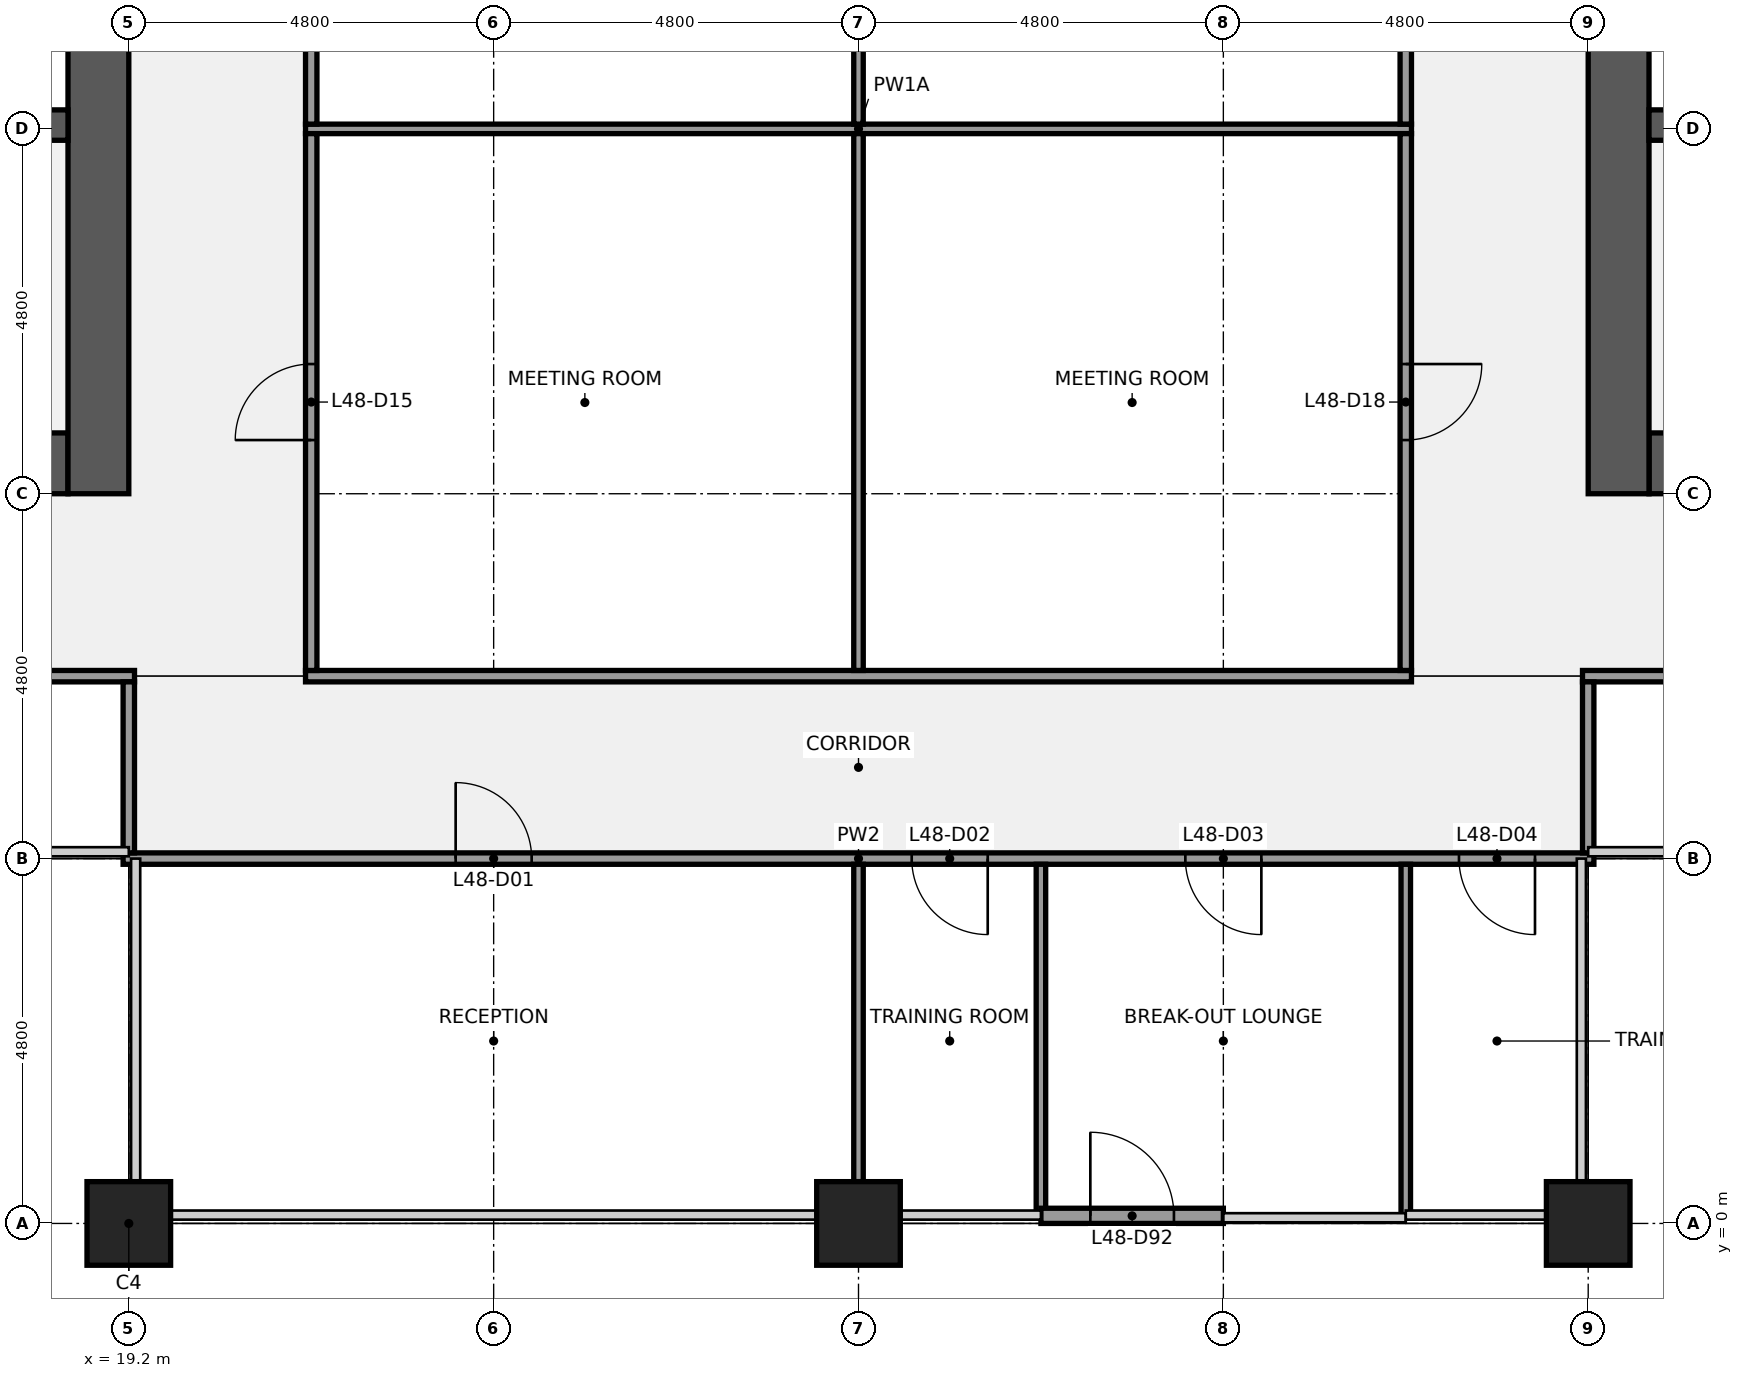
"""IFC4 building model, lengths in metres.
Left out: names, types, materials, properties, quantities, classifications, styles, units other than length and angle.
Written with IfcOpenShell. Run it as: python <this file> out.ifc"""

import sys

from ifc_helpers import new_model, si_unit, direction, frame, frame_2d, origin, origin_2d, place, context, subcontext, project, spatial, rectangle, extrude, element, fill, save


model = new_model("IFC4")
c1 = context("Model", 3, precision=1e-05, world=origin(), true_north=direction((0.0, 1.0)))
c2 = subcontext(c1, "Body", "Model", "MODEL_VIEW")
j1 = project(units=[si_unit("LENGTHUNIT", "METRE"), si_unit("PLANEANGLEUNIT", "RADIAN")], contexts=[c1])
p1 = place(None, origin())
s1 = spatial("IfcSite", under=j1, at=p1, CompositionType="ELEMENT")
p2 = place(p1, origin())
s2 = spatial("IfcBuilding", under=s1, at=p2, CompositionType="ELEMENT")
p3 = place(p2, frame((0.0, 0.0, 221.2)))
s3 = spatial("IfcBuildingStorey", under=s2, at=p3, CompositionType="ELEMENT", Elevation=221.2)
for number, where, z_axis, x_axis in (
    (1, (19.2, 0.0, 0.0), (0.0, 0.0, 1.0), (1.0, 0.0, 0.0)),
    (2, (28.8, 0.0, 0.0), (0.0, 0.0, 1.0), (1.0, 0.0, 0.0)),
    (3, (38.4, 0.0, 0.0), (0.0, 0.0, 1.0), (1.0, 0.0, 0.0)),
):
    element("IfcColumn", number, at=place(p3, frame(where, z_axis=z_axis, x_axis=x_axis)), inside=s3, PredefinedType="COLUMN", context=c2, shape_type="SweptSolid", body=[
        extrude(rectangle(XDim=1.1, YDim=1.1, at=origin_2d()), origin(), (0.0, 0.0, 1.0), 4.0),
    ])
p4 = place(p3, frame((18.4, 10.0, 0.0), z_axis=(0.0, 0.0, 1.0), x_axis=(-1.0, 0.0, 0.0)))
e4 = element("IfcWall", 4, at=p4, inside=s3, PredefinedType="SHEAR", context=c2, shape_type="SweptSolid", body=[
    extrude(rectangle(XDim=4.0, YDim=0.8, at=frame_2d((2.0, 0.0))), origin(), (0.0, 0.0, 1.0), 3.84),
])
p5 = place(p4, frame((1.05, 0.0, 0.0)))
e5 = element("IfcOpeningElement", 5, at=p5, cuts=e4, PredefinedType="OPENING", context=c2, shape_type="SweptSolid", body=[
    extrude(rectangle(XDim=1.1, YDim=2.1, at=frame_2d((0.55, 1.05))), frame((0.0, 0.41, 0.0), z_axis=(0.0, -1.0, 0.0), x_axis=(1.0, 0.0, 0.0)), (0.0, 0.0, 1.0), 0.82),
])
p6 = place(p3, frame((18.8, 38.4, 0.0), z_axis=(0.0, 0.0, 1.0), x_axis=(0.0, -1.0, 0.0)))
e6 = element("IfcWall", 6, at=p6, inside=s3, PredefinedType="SHEAR", context=c2, shape_type="SweptSolid", body=[
    extrude(rectangle(XDim=28.8, YDim=0.8, at=frame_2d((14.4, 0.0))), origin(), (0.0, 0.0, 1.0), 3.84),
])
p7 = place(p6, frame((18.3, 0.0, 0.0)))
e7 = element("IfcOpeningElement", 7, at=p7, cuts=e6, PredefinedType="OPENING", context=c2, shape_type="SweptSolid", body=[
    extrude(rectangle(XDim=1.8, YDim=2.1, at=frame_2d((0.9, 1.05))), frame((0.0, 0.41, 0.0), z_axis=(0.0, -1.0, 0.0), x_axis=(1.0, 0.0, 0.0)), (0.0, 0.0, 1.0), 0.82),
])
p8 = place(p6, frame((8.7, 0.0, 0.0)))
e8 = element("IfcOpeningElement", 8, at=p8, cuts=e6, PredefinedType="OPENING", context=c2, shape_type="SweptSolid", body=[
    extrude(rectangle(XDim=1.8, YDim=2.1, at=frame_2d((0.9, 1.05))), frame((0.0, 0.41, 0.0), z_axis=(0.0, -1.0, 0.0), x_axis=(1.0, 0.0, 0.0)), (0.0, 0.0, 1.0), 0.82),
])
p9 = place(p3, frame((0.8, 14.45, 0.0), z_axis=(0.0, 0.0, 1.0), x_axis=(1.0, 0.0, 0.0)))
e9 = element("IfcWall", 9, at=p9, inside=s3, PredefinedType="SHEAR", context=c2, shape_type="SweptSolid", body=[
    extrude(rectangle(XDim=17.6, YDim=0.4, at=frame_2d((8.8, 0.0))), origin(), (0.0, 0.0, 1.0), 3.84),
])
p10 = place(p3, frame((48.0, 10.0, 0.0), z_axis=(0.0, 0.0, 1.0), x_axis=(-1.0, 0.0, 0.0)))
e10 = element("IfcWall", 10, at=p10, inside=s3, PredefinedType="SHEAR", context=c2, shape_type="SweptSolid", body=[
    extrude(rectangle(XDim=8.8, YDim=0.8, at=frame_2d((4.4, 0.0))), origin(), (0.0, 0.0, 1.0), 3.84),
])
p11 = place(p10, frame((6.65, 0.0, 0.0)))
e11 = element("IfcOpeningElement", 11, at=p11, cuts=e10, PredefinedType="OPENING", context=c2, shape_type="SweptSolid", body=[
    extrude(rectangle(XDim=1.1, YDim=2.1, at=frame_2d((0.55, 1.05))), frame((0.0, 0.41, 0.0), z_axis=(0.0, -1.0, 0.0), x_axis=(1.0, 0.0, 0.0)), (0.0, 0.0, 1.0), 0.82),
])
p12 = place(p3, frame((38.8, 9.6, 0.0), z_axis=(0.0, 0.0, 1.0), x_axis=(0.0, 1.0, 0.0)))
e12 = element("IfcWall", 12, at=p12, inside=s3, PredefinedType="SHEAR", context=c2, shape_type="SweptSolid", body=[
    extrude(rectangle(XDim=28.8, YDim=0.8, at=frame_2d((14.4, 0.0))), origin(), (0.0, 0.0, 1.0), 3.84),
])
p13 = place(p12, frame((8.7, 0.0, 0.0)))
e13 = element("IfcOpeningElement", 13, at=p13, cuts=e12, PredefinedType="OPENING", context=c2, shape_type="SweptSolid", body=[
    extrude(rectangle(XDim=1.8, YDim=2.1, at=frame_2d((0.9, 1.05))), frame((0.0, 0.41, 0.0), z_axis=(0.0, -1.0, 0.0), x_axis=(1.0, 0.0, 0.0)), (0.0, 0.0, 1.0), 0.82),
])
p14 = place(p12, frame((18.3, 0.0, 0.0)))
e14 = element("IfcOpeningElement", 14, at=p14, cuts=e12, PredefinedType="OPENING", context=c2, shape_type="SweptSolid", body=[
    extrude(rectangle(XDim=1.8, YDim=2.1, at=frame_2d((0.9, 1.05))), frame((0.0, 0.41, 0.0), z_axis=(0.0, -1.0, 0.0), x_axis=(1.0, 0.0, 0.0)), (0.0, 0.0, 1.0), 0.82),
])
p15 = place(p3, frame((39.2, 14.45, 0.0), z_axis=(0.0, 0.0, 1.0), x_axis=(1.0, 0.0, 0.0)))
e15 = element("IfcWall", 15, at=p15, inside=s3, PredefinedType="SHEAR", context=c2, shape_type="SweptSolid", body=[
    extrude(rectangle(XDim=17.6, YDim=0.4, at=frame_2d((8.8, 0.0))), origin(), (0.0, 0.0, 1.0), 3.84),
])
p16 = place(p3, frame((19.125, 4.8, 0.0), z_axis=(0.0, 0.0, 1.0), x_axis=(1.0, 0.0, 0.0)))
e16 = element("IfcWall", 16, at=p16, inside=s3, PredefinedType="PARTITIONING", context=c2, shape_type="SweptSolid", body=[
    extrude(rectangle(XDim=19.35, YDim=0.15, at=frame_2d((9.675, 0.0))), origin(), (0.0, 0.0, 1.0), 2.87),
])
p17 = place(p16, frame((4.375, 0.0, 0.0)))
e17 = element("IfcOpeningElement", 17, at=p17, cuts=e16, PredefinedType="OPENING", context=c2, shape_type="SweptSolid", body=[
    extrude(rectangle(XDim=1.0, YDim=2.1, at=frame_2d((0.5, 1.05))), frame((0.0, 0.085, 0.0), z_axis=(0.0, -1.0, 0.0), x_axis=(1.0, 0.0, 0.0)), (0.0, 0.0, 1.0), 0.17),
])
p18 = place(p16, frame((10.375, 0.0, 0.0)))
e18 = element("IfcOpeningElement", 18, at=p18, cuts=e16, PredefinedType="OPENING", context=c2, shape_type="SweptSolid", body=[
    extrude(rectangle(XDim=1.0, YDim=2.1, at=frame_2d((0.5, 1.05))), frame((0.0, 0.085, 0.0), z_axis=(0.0, -1.0, 0.0), x_axis=(1.0, 0.0, 0.0)), (0.0, 0.0, 1.0), 0.17),
])
p19 = place(p16, frame((13.975, 0.0, 0.0)))
e19 = element("IfcOpeningElement", 19, at=p19, cuts=e16, PredefinedType="OPENING", context=c2, shape_type="SweptSolid", body=[
    extrude(rectangle(XDim=1.0, YDim=2.1, at=frame_2d((0.5, 1.05))), frame((0.0, 0.085, 0.0), z_axis=(0.0, -1.0, 0.0), x_axis=(1.0, 0.0, 0.0)), (0.0, 0.0, 1.0), 0.17),
])
p20 = place(p16, frame((17.575, 0.0, 0.0)))
e20 = element("IfcOpeningElement", 20, at=p20, cuts=e16, PredefinedType="OPENING", context=c2, shape_type="SweptSolid", body=[
    extrude(rectangle(XDim=1.0, YDim=2.1, at=frame_2d((0.5, 1.05))), frame((0.0, 0.085, 0.0), z_axis=(0.0, -1.0, 0.0), x_axis=(1.0, 0.0, 0.0)), (0.0, 0.0, 1.0), 0.17),
])
p21 = place(p3, frame((14.5, 7.2, 0.0), z_axis=(0.0, 0.0, 1.0), x_axis=(1.0, 0.0, 0.0)))
e21 = element("IfcWall", 21, at=p21, inside=s3, PredefinedType="PARTITIONING", context=c2, shape_type="SweptSolid", body=[
    extrude(rectangle(XDim=4.775, YDim=0.15, at=frame_2d((2.387, 0.0))), origin(), (0.0, 0.0, 1.0), 2.87),
])
p22 = place(p21, frame((1.85, 0.0, 0.0)))
e22 = element("IfcOpeningElement", 22, at=p22, cuts=e21, PredefinedType="OPENING", context=c2, shape_type="SweptSolid", body=[
    extrude(rectangle(XDim=1.0, YDim=2.1, at=frame_2d((0.5, 1.05))), frame((0.0, 0.085, 0.0), z_axis=(0.0, -1.0, 0.0), x_axis=(1.0, 0.0, 0.0)), (0.0, 0.0, 1.0), 0.17),
])
p23 = place(p3, frame((21.525, 7.2, 0.0), z_axis=(0.0, 0.0, 1.0), x_axis=(1.0, 0.0, 0.0)))
e23 = element("IfcWall", 23, at=p23, inside=s3, PredefinedType="PARTITIONING", context=c2, shape_type="SweptSolid", body=[
    extrude(rectangle(XDim=14.55, YDim=0.15, at=frame_2d((7.275, 0.0))), origin(), (0.0, 0.0, 1.0), 2.87),
])
p24 = place(p3, frame((38.325, 7.2, 0.0), z_axis=(0.0, 0.0, 1.0), x_axis=(1.0, 0.0, 0.0)))
e24 = element("IfcWall", 24, at=p24, inside=s3, PredefinedType="PARTITIONING", context=c2, shape_type="SweptSolid", body=[
    extrude(rectangle(XDim=9.575, YDim=0.15, at=frame_2d((4.788, 0.0))), origin(), (0.0, 0.0, 1.0), 2.87),
])
p25 = place(p24, frame((4.325, 0.0, 0.0)))
e25 = element("IfcOpeningElement", 25, at=p25, cuts=e24, PredefinedType="OPENING", context=c2, shape_type="SweptSolid", body=[
    extrude(rectangle(XDim=1.0, YDim=2.1, at=frame_2d((0.5, 1.05))), frame((0.0, 0.085, 0.0), z_axis=(0.0, -1.0, 0.0), x_axis=(1.0, 0.0, 0.0)), (0.0, 0.0, 1.0), 0.17),
])
p26 = place(p3, frame((21.525, 14.4, 0.0), z_axis=(0.0, 0.0, 1.0), x_axis=(1.0, 0.0, 0.0)))
e26 = element("IfcWall", 26, at=p26, inside=s3, PredefinedType="PARTITIONING", context=c2, shape_type="SweptSolid", body=[
    extrude(rectangle(XDim=14.55, YDim=0.125, at=frame_2d((7.275, 0.0))), origin(), (0.0, 0.0, 1.0), 2.87),
])
p27 = place(p3, frame((19.2, 4.875, 0.0), z_axis=(0.0, 0.0, 1.0), x_axis=(0.0, 1.0, 0.0)))
e27 = element("IfcWall", 27, at=p27, inside=s3, PredefinedType="PARTITIONING", context=c2, shape_type="SweptSolid", body=[
    extrude(rectangle(XDim=2.25, YDim=0.15, at=frame_2d((1.125, 0.0))), origin(), (0.0, 0.0, 1.0), 2.87),
])
p28 = place(p3, frame((21.6, 7.275, 0.0), z_axis=(0.0, 0.0, 1.0), x_axis=(0.0, 1.0, 0.0)))
e28 = element("IfcWall", 28, at=p28, inside=s3, PredefinedType="PARTITIONING", context=c2, shape_type="SweptSolid", body=[
    extrude(rectangle(XDim=7.062, YDim=0.15, at=frame_2d((3.531, 0.0))), origin(), (0.0, 0.0, 1.0), 2.87),
])
p29 = place(p28, frame((3.031, 0.0, 0.0)))
e29 = element("IfcOpeningElement", 29, at=p29, cuts=e28, PredefinedType="OPENING", context=c2, shape_type="SweptSolid", body=[
    extrude(rectangle(XDim=1.0, YDim=2.1, at=frame_2d((0.5, 1.05))), frame((0.0, 0.085, 0.0), z_axis=(0.0, -1.0, 0.0), x_axis=(1.0, 0.0, 0.0)), (0.0, 0.0, 1.0), 0.17),
])
p30 = place(p3, frame((21.6, 14.462, 0.0), z_axis=(0.0, 0.0, 1.0), x_axis=(0.0, 1.0, 0.0)))
e30 = element("IfcWall", 30, at=p30, inside=s3, PredefinedType="PARTITIONING", context=c2, shape_type="SweptSolid", body=[
    extrude(rectangle(XDim=9.475, YDim=0.15, at=frame_2d((4.738, 0.0))), origin(), (0.0, 0.0, 1.0), 2.87),
])
p31 = place(p30, frame((4.238, 0.0, 0.0)))
e31 = element("IfcOpeningElement", 31, at=p31, cuts=e30, PredefinedType="OPENING", context=c2, shape_type="SweptSolid", body=[
    extrude(rectangle(XDim=1.0, YDim=2.1, at=frame_2d((0.5, 1.05))), frame((0.0, 0.085, 0.0), z_axis=(0.0, -1.0, 0.0), x_axis=(1.0, 0.0, 0.0)), (0.0, 0.0, 1.0), 0.17),
])
p32 = place(p3, frame((28.8, 0.55, 0.0), z_axis=(0.0, 0.0, 1.0), x_axis=(0.0, 1.0, 0.0)))
e32 = element("IfcWall", 32, at=p32, inside=s3, PredefinedType="PARTITIONING", context=c2, shape_type="SweptSolid", body=[
    extrude(rectangle(XDim=4.175, YDim=0.125, at=frame_2d((2.087, 0.0))), origin(), (0.0, 0.0, 1.0), 2.87),
])
p33 = place(p3, frame((28.8, 7.275, 0.0), z_axis=(0.0, 0.0, 1.0), x_axis=(0.0, 1.0, 0.0)))
e33 = element("IfcWall", 33, at=p33, inside=s3, PredefinedType="PARTITIONING", context=c2, shape_type="SweptSolid", body=[
    extrude(rectangle(XDim=7.062, YDim=0.125, at=frame_2d((3.531, 0.0))), origin(), (0.0, 0.0, 1.0), 2.87),
])
p34 = place(p3, frame((28.8, 14.462, 0.0), z_axis=(0.0, 0.0, 1.0), x_axis=(0.0, 1.0, 0.0)))
e34 = element("IfcWall", 34, at=p34, inside=s3, PredefinedType="PARTITIONING", context=c2, shape_type="SweptSolid", body=[
    extrude(rectangle(XDim=9.475, YDim=0.125, at=frame_2d((4.738, 0.0))), origin(), (0.0, 0.0, 1.0), 2.87),
])
for number, where, z_axis, x_axis in (
    (35, (31.2, 0.1, 0.0), (0.0, 0.0, 1.0), (0.0, 1.0, 0.0)),
    (36, (36.0, 0.1, 0.0), (0.0, 0.0, 1.0), (0.0, 1.0, 0.0)),
):
    element("IfcWall", number, at=place(p3, frame(where, z_axis=z_axis, x_axis=x_axis)), inside=s3, PredefinedType="PARTITIONING", context=c2, shape_type="SweptSolid", body=[
        extrude(rectangle(XDim=4.625, YDim=0.125, at=frame_2d((2.312, 0.0))), origin(), (0.0, 0.0, 1.0), 2.87),
    ])
p35 = place(p3, frame((36.0, 7.275, 0.0), z_axis=(0.0, 0.0, 1.0), x_axis=(0.0, 1.0, 0.0)))
e37 = element("IfcWall", 37, at=p35, inside=s3, PredefinedType="PARTITIONING", context=c2, shape_type="SweptSolid", body=[
    extrude(rectangle(XDim=7.062, YDim=0.15, at=frame_2d((3.531, 0.0))), origin(), (0.0, 0.0, 1.0), 2.87),
])
p36 = place(p35, frame((3.031, 0.0, 0.0)))
e38 = element("IfcOpeningElement", 38, at=p36, cuts=e37, PredefinedType="OPENING", context=c2, shape_type="SweptSolid", body=[
    extrude(rectangle(XDim=1.0, YDim=2.1, at=frame_2d((0.5, 1.05))), frame((0.0, 0.085, 0.0), z_axis=(0.0, -1.0, 0.0), x_axis=(1.0, 0.0, 0.0)), (0.0, 0.0, 1.0), 0.17),
])
p37 = place(p3, frame((36.0, 14.462, 0.0), z_axis=(0.0, 0.0, 1.0), x_axis=(0.0, 1.0, 0.0)))
e39 = element("IfcWall", 39, at=p37, inside=s3, PredefinedType="PARTITIONING", context=c2, shape_type="SweptSolid", body=[
    extrude(rectangle(XDim=9.475, YDim=0.15, at=frame_2d((4.738, 0.0))), origin(), (0.0, 0.0, 1.0), 2.87),
])
p38 = place(p37, frame((4.238, 0.0, 0.0)))
e40 = element("IfcOpeningElement", 40, at=p38, cuts=e39, PredefinedType="OPENING", context=c2, shape_type="SweptSolid", body=[
    extrude(rectangle(XDim=1.0, YDim=2.1, at=frame_2d((0.5, 1.05))), frame((0.0, 0.085, 0.0), z_axis=(0.0, -1.0, 0.0), x_axis=(1.0, 0.0, 0.0)), (0.0, 0.0, 1.0), 0.17),
])
p39 = place(p3, frame((38.4, 4.875, 0.0), z_axis=(0.0, 0.0, 1.0), x_axis=(0.0, 1.0, 0.0)))
e41 = element("IfcWall", 41, at=p39, inside=s3, PredefinedType="PARTITIONING", context=c2, shape_type="SweptSolid", body=[
    extrude(rectangle(XDim=2.25, YDim=0.15, at=frame_2d((1.125, 0.0))), origin(), (0.0, 0.0, 1.0), 2.87),
])
p40 = place(p3, frame((31.2, 0.1, 0.0), z_axis=(0.0, 0.0, 1.0), x_axis=(1.0, 0.0, 0.0)))
e42 = element("IfcWall", 42, at=p40, inside=s3, PredefinedType="SOLIDWALL", context=c2, shape_type="SweptSolid", body=[
    extrude(rectangle(XDim=2.4, YDim=0.2, at=frame_2d((1.2, 0.0))), origin(), (0.0, 0.0, 1.0), 3.314),
])
p41 = place(p40, frame((0.65, 0.0, 0.0)))
e43 = element("IfcOpeningElement", 43, at=p41, cuts=e42, PredefinedType="OPENING", context=c2, shape_type="SweptSolid", body=[
    extrude(rectangle(XDim=1.1, YDim=2.1, at=frame_2d((0.55, 1.05))), frame((0.0, 0.11, 0.0), z_axis=(0.0, -1.0, 0.0), x_axis=(1.0, 0.0, 0.0)), (0.0, 0.0, 1.0), 0.22),
])
for number, where, z_axis, x_axis in (
    (44, (19.2, -1.025, 0.0), (0.0, 0.0, 1.0), (1.0, 0.0, 0.0)),
    (45, (38.4, -1.025, 0.0), (0.0, 0.0, 1.0), (1.0, 0.0, 0.0)),
):
    element("IfcColumn", number, at=place(p3, frame(where, z_axis=z_axis, x_axis=x_axis)), inside=s3, PredefinedType="PILASTER", context=c2, shape_type="SweptSolid", body=[
        extrude(rectangle(XDim=2.4, YDim=0.95, at=origin_2d()), origin(), (0.0, 0.0, 1.0), 4.0),
    ])
p42 = place(p17, origin())
e46 = element("IfcDoor", 46, at=p42, inside=s3, OperationType="SINGLE_SWING_LEFT", PredefinedType="DOOR", context=c2, shape_type="SweptSolid", body=[
    extrude(rectangle(XDim=1.0, YDim=2.1, at=frame_2d((0.5, 1.05))), frame((0.0, 0.025, 0.0), z_axis=(0.0, -1.0, 0.0), x_axis=(1.0, 0.0, 0.0)), (0.0, 0.0, 1.0), 0.05),
])
fill(e17, e46)
p43 = place(p18, origin())
e47 = element("IfcDoor", 47, at=p43, inside=s3, OperationType="SINGLE_SWING_RIGHT", PredefinedType="DOOR", context=c2, shape_type="SweptSolid", body=[
    extrude(rectangle(XDim=1.0, YDim=2.1, at=frame_2d((0.5, 1.05))), frame((0.0, 0.025, 0.0), z_axis=(0.0, -1.0, 0.0), x_axis=(1.0, 0.0, 0.0)), (0.0, 0.0, 1.0), 0.05),
])
fill(e18, e47)
p44 = place(p19, origin())
e48 = element("IfcDoor", 48, at=p44, inside=s3, OperationType="SINGLE_SWING_RIGHT", PredefinedType="DOOR", context=c2, shape_type="SweptSolid", body=[
    extrude(rectangle(XDim=1.0, YDim=2.1, at=frame_2d((0.5, 1.05))), frame((0.0, 0.025, 0.0), z_axis=(0.0, -1.0, 0.0), x_axis=(1.0, 0.0, 0.0)), (0.0, 0.0, 1.0), 0.05),
])
fill(e19, e48)
p45 = place(p20, origin())
e49 = element("IfcDoor", 49, at=p45, inside=s3, OperationType="SINGLE_SWING_RIGHT", PredefinedType="DOOR", context=c2, shape_type="SweptSolid", body=[
    extrude(rectangle(XDim=1.0, YDim=2.1, at=frame_2d((0.5, 1.05))), frame((0.0, 0.025, 0.0), z_axis=(0.0, -1.0, 0.0), x_axis=(1.0, 0.0, 0.0)), (0.0, 0.0, 1.0), 0.05),
])
fill(e20, e49)
p46 = place(p29, origin())
e50 = element("IfcDoor", 50, at=p46, inside=s3, OperationType="SINGLE_SWING_LEFT", PredefinedType="DOOR", context=c2, shape_type="SweptSolid", body=[
    extrude(rectangle(XDim=1.0, YDim=2.1, at=frame_2d((0.5, 1.05))), frame((0.0, 0.025, 0.0), z_axis=(0.0, -1.0, 0.0), x_axis=(1.0, 0.0, 0.0)), (0.0, 0.0, 1.0), 0.05),
])
fill(e29, e50)
p47 = place(p36, origin())
e51 = element("IfcDoor", 51, at=p47, inside=s3, OperationType="SINGLE_SWING_RIGHT", PredefinedType="DOOR", context=c2, shape_type="SweptSolid", body=[
    extrude(rectangle(XDim=1.0, YDim=2.1, at=frame_2d((0.5, 1.05))), frame((0.0, 0.025, 0.0), z_axis=(0.0, -1.0, 0.0), x_axis=(1.0, 0.0, 0.0)), (0.0, 0.0, 1.0), 0.05),
])
fill(e38, e51)
p48 = place(p41, origin())
e52 = element("IfcDoor", 52, at=p48, inside=s3, OperationType="SINGLE_SWING_LEFT", PredefinedType="DOOR", context=c2, shape_type="SweptSolid", body=[
    extrude(rectangle(XDim=1.1, YDim=2.1, at=frame_2d((0.55, 1.05))), frame((0.0, 0.025, 0.0), z_axis=(0.0, -1.0, 0.0), x_axis=(1.0, 0.0, 0.0)), (0.0, 0.0, 1.0), 0.05),
])
fill(e43, e52)
save(model, sys.argv[1])
